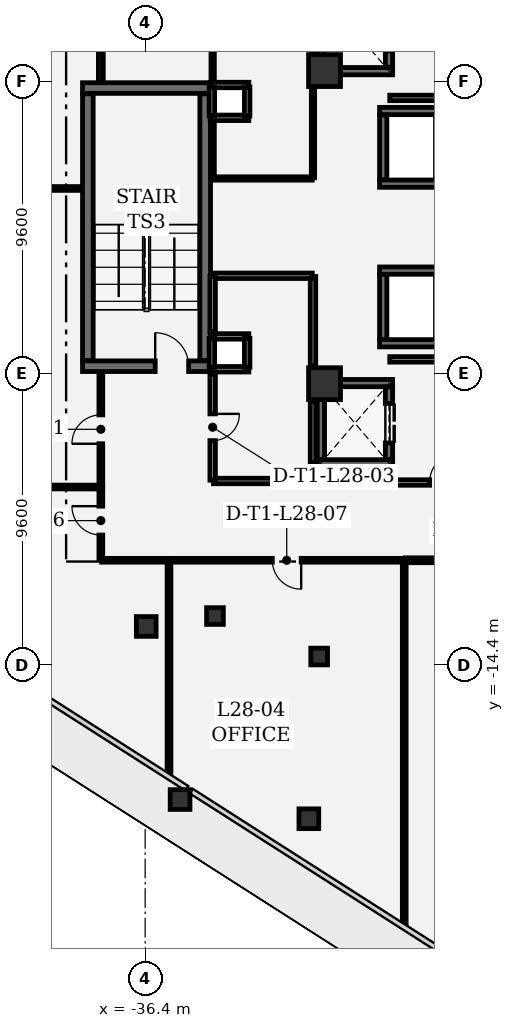
"""IFC4 building model, lengths in metres.
Left out: names, types, materials, properties, quantities, classifications, styles, units other than length and angle.
Written with IfcOpenShell. Run it as: python <this file> out.ifc"""

import sys

from ifc_helpers import new_model, si_unit, direction, frame, frame_2d, origin, origin_2d, place, context, subcontext, project, spatial, rectangle, extrude, element, fill, save


model = new_model("IFC4")
c1 = context("Model", 3, precision=1e-05, world=origin(), true_north=direction((0.0, 1.0)))
c2 = subcontext(c1, "Body", "Model", "MODEL_VIEW")
j1 = project(units=[si_unit("LENGTHUNIT", "METRE"), si_unit("PLANEANGLEUNIT", "RADIAN")], contexts=[c1])
p1 = place(None, origin())
s1 = spatial("IfcSite", under=j1, at=p1, CompositionType="ELEMENT")
p2 = place(p1, origin())
s2 = spatial("IfcBuilding", under=s1, at=p2, CompositionType="ELEMENT")
p3 = place(p2, frame((0.0, 0.0, 126.0)))
s3 = spatial("IfcBuildingStorey", under=s2, at=p3, CompositionType="ELEMENT", Elevation=126.0)
for number, where, z_axis, x_axis in (
    (1, (-30.5, 5.15, 0.0), (0.0, 0.0, 1.0), (1.0, 0.0, 0.0)),
    (2, (-30.5, -5.15, 0.0), (0.0, 0.0, 1.0), (1.0, 0.0, 0.0)),
):
    element("IfcColumn", number, at=place(p3, frame(where, z_axis=z_axis, x_axis=x_axis)), inside=s3, PredefinedType="COLUMN", context=c2, shape_type="SweptSolid", body=[
        extrude(rectangle(XDim=1.05, YDim=1.05, at=origin_2d()), origin(), (0.0, 0.0, 1.0), 4.05),
    ])
for number, where, z_axis, x_axis in (
    (3, (-35.252, -18.829, 0.0), (0.0, 0.0, 1.0), (1.0, 0.0, 0.0)),
    (4, (-31.016, -19.46, 0.0), (0.0, 0.0, 1.0), (1.0, 0.0, 0.0)),
    (5, (-36.365, -13.135, 0.0), (0.0, 0.0, 1.0), (1.0, 0.0, 0.0)),
):
    element("IfcColumn", number, at=place(p3, frame(where, z_axis=z_axis, x_axis=x_axis)), inside=s3, PredefinedType="COLUMN", context=c2, shape_type="SweptSolid", body=[
        extrude(rectangle(XDim=0.65, YDim=0.65, at=origin_2d()), origin(), (0.0, 0.0, 1.0), 4.05),
    ])
for number, where, z_axis, x_axis in (
    (6, (-34.104, -12.792, 0.0), (0.0, 0.0, 1.0), (1.0, 0.0, 0.0)),
    (7, (-30.677, -14.124, 0.0), (0.0, 0.0, 1.0), (1.0, 0.0, 0.0)),
):
    element("IfcColumn", number, at=place(p3, frame(where, z_axis=z_axis, x_axis=x_axis)), inside=s3, PredefinedType="COLUMN", context=c2, shape_type="SweptSolid", body=[
        extrude(rectangle(XDim=0.55, YDim=0.55, at=origin_2d()), origin(), (0.0, 0.0, 1.0), 4.05),
    ])
p4 = place(p3, frame((-38.46, -4.575, 0.0), z_axis=(0.0, 0.0, 1.0), x_axis=(1.0, 0.0, 0.0)))
e8 = element("IfcWall", 8, at=p4, inside=s3, PredefinedType="SHEAR", context=c2, shape_type="SweptSolid", body=[
    extrude(rectangle(XDim=4.21, YDim=0.35, at=frame_2d((2.105, 0.0))), origin(), (0.0, 0.0, 1.0), 3.77),
])
p5 = place(p4, frame((2.39, 0.0, 0.0)))
e9 = element("IfcOpeningElement", 9, at=p5, cuts=e8, PredefinedType="OPENING", context=c2, shape_type="SweptSolid", body=[
    extrude(rectangle(XDim=1.1, YDim=2.2, at=frame_2d((0.55, 1.1))), frame((0.0, 0.185, 0.0), z_axis=(0.0, -1.0, 0.0), x_axis=(1.0, 0.0, 0.0)), (0.0, 0.0, 1.0), 0.37),
])
p6 = place(p3, frame((-34.25, 4.575, 0.0), z_axis=(0.0, 0.0, 1.0), x_axis=(-1.0, 0.0, 0.0)))
e10 = element("IfcWall", 10, at=p6, inside=s3, PredefinedType="SHEAR", context=c2, shape_type="SweptSolid", body=[
    extrude(rectangle(XDim=4.21, YDim=0.35, at=frame_2d((2.105, 0.0))), origin(), (0.0, 0.0, 1.0), 3.77),
])
for number, where, z_axis, x_axis in (
    (11, (-34.425, -4.385, 0.0), (0.0, 0.0, 1.0), (0.0, 1.0, 0.0)),
    (12, (-38.285, 4.385, 0.0), (0.0, 0.0, 1.0), (0.0, -1.0, 0.0)),
):
    element("IfcWall", number, at=place(p3, frame(where, z_axis=z_axis, x_axis=x_axis)), inside=s3, PredefinedType="SHEAR", context=c2, shape_type="SweptSolid", body=[
        extrude(rectangle(XDim=8.77, YDim=0.35, at=frame_2d((4.385, 0.0))), origin(), (0.0, 0.0, 1.0), 3.77),
    ])
p7 = place(p3, frame((-28.26, 5.13, 0.0), z_axis=(0.0, 0.0, 1.0), x_axis=(-1.0, 0.0, 0.0)))
e13 = element("IfcWall", 13, at=p7, inside=s3, PredefinedType="SHEAR", context=c2, shape_type="SweptSolid", body=[
    extrude(rectangle(XDim=2.48, YDim=0.24, at=frame_2d((1.24, 0.0))), origin(), (0.0, 0.0, 1.0), 3.77),
])
p8 = place(p3, frame((-30.62, 5.262, 0.0), z_axis=(0.0, 0.0, 1.0), x_axis=(0.0, 1.0, 0.0)))
e14 = element("IfcWall", 14, at=p8, inside=s3, PredefinedType="SHEAR", context=c2, shape_type="SweptSolid", body=[
    extrude(rectangle(XDim=2.376, YDim=0.24, at=frame_2d((1.188, 0.0))), origin(), (0.0, 0.0, 1.0), 3.77),
])
p9 = place(p3, frame((-28.38, 7.638, 0.0), z_axis=(0.0, 0.0, 1.0), x_axis=(0.0, -1.0, 0.0)))
e15 = element("IfcWall", 15, at=p9, inside=s3, PredefinedType="SHEAR", context=c2, shape_type="SweptSolid", body=[
    extrude(rectangle(XDim=2.376, YDim=0.24, at=frame_2d((1.188, 0.0))), origin(), (0.0, 0.0, 1.0), 3.77),
])
p10 = place(p9, frame((0.538, 0.0, 0.0)))
e16 = element("IfcOpeningElement", 16, at=p10, cuts=e15, PredefinedType="OPENING", context=c2, shape_type="SweptSolid", body=[
    extrude(rectangle(XDim=1.3, YDim=2.3, at=frame_2d((0.65, 1.15))), frame((0.0, 0.13, 0.0), z_axis=(0.0, -1.0, 0.0), x_axis=(1.0, 0.0, 0.0)), (0.0, 0.0, 1.0), 0.26),
])
for number, where, z_axis, x_axis in (
    (17, (-28.26, -7.77, 0.0), (0.0, 0.0, 1.0), (-1.0, 0.0, 0.0)),
    (18, (-30.74, -5.13, 0.0), (0.0, 0.0, 1.0), (1.0, 0.0, 0.0)),
):
    element("IfcWall", number, at=place(p3, frame(where, z_axis=z_axis, x_axis=x_axis)), inside=s3, PredefinedType="SHEAR", context=c2, shape_type="SweptSolid", body=[
        extrude(rectangle(XDim=2.48, YDim=0.24, at=frame_2d((1.24, 0.0))), origin(), (0.0, 0.0, 1.0), 3.77),
    ])
p11 = place(p3, frame((-30.62, -7.638, 0.0), z_axis=(0.0, 0.0, 1.0), x_axis=(0.0, 1.0, 0.0)))
e19 = element("IfcWall", 19, at=p11, inside=s3, PredefinedType="SHEAR", context=c2, shape_type="SweptSolid", body=[
    extrude(rectangle(XDim=2.376, YDim=0.24, at=frame_2d((1.188, 0.0))), origin(), (0.0, 0.0, 1.0), 3.77),
])
p12 = place(p3, frame((-28.38, -5.262, 0.0), z_axis=(0.0, 0.0, 1.0), x_axis=(0.0, -1.0, 0.0)))
e20 = element("IfcWall", 20, at=p12, inside=s3, PredefinedType="SHEAR", context=c2, shape_type="SweptSolid", body=[
    extrude(rectangle(XDim=2.376, YDim=0.24, at=frame_2d((1.188, 0.0))), origin(), (0.0, 0.0, 1.0), 3.77),
])
p13 = place(p12, frame((0.538, 0.0, 0.0)))
e21 = element("IfcOpeningElement", 21, at=p13, cuts=e20, PredefinedType="OPENING", context=c2, shape_type="SweptSolid", body=[
    extrude(rectangle(XDim=1.3, YDim=2.3, at=frame_2d((0.65, 1.15))), frame((0.0, 0.13, 0.0), z_axis=(0.0, -1.0, 0.0), x_axis=(1.0, 0.0, 0.0)), (0.0, 0.0, 1.0), 0.26),
])
for number, where, z_axis, x_axis in (
    (22, (-26.61, 1.43, 0.0), (0.0, 0.0, 1.0), (-1.0, 0.0, 0.0)),
    (23, (-28.69, 3.82, 0.0), (0.0, 0.0, 1.0), (1.0, 0.0, 0.0)),
):
    element("IfcWall", number, at=place(p3, frame(where, z_axis=z_axis, x_axis=x_axis)), inside=s3, PredefinedType="SHEAR", context=c2, shape_type="SweptSolid", body=[
        extrude(rectangle(XDim=2.08, YDim=0.24, at=frame_2d((1.04, 0.0))), origin(), (0.0, 0.0, 1.0), 3.77),
    ])
p14 = place(p3, frame((-28.57, 1.562, 0.0), z_axis=(0.0, 0.0, 1.0), x_axis=(0.0, 1.0, 0.0)))
e24 = element("IfcWall", 24, at=p14, inside=s3, PredefinedType="SHEAR", context=c2, shape_type="SweptSolid", body=[
    extrude(rectangle(XDim=2.126, YDim=0.24, at=frame_2d((1.063, 0.0))), origin(), (0.0, 0.0, 1.0), 3.77),
])
for number, where, z_axis, x_axis in (
    (25, (-26.61, -3.82, 0.0), (0.0, 0.0, 1.0), (-1.0, 0.0, 0.0)),
    (26, (-28.69, -1.43, 0.0), (0.0, 0.0, 1.0), (1.0, 0.0, 0.0)),
):
    element("IfcWall", number, at=place(p3, frame(where, z_axis=z_axis, x_axis=x_axis)), inside=s3, PredefinedType="SHEAR", context=c2, shape_type="SweptSolid", body=[
        extrude(rectangle(XDim=2.08, YDim=0.24, at=frame_2d((1.04, 0.0))), origin(), (0.0, 0.0, 1.0), 3.77),
    ])
p15 = place(p3, frame((-28.57, -3.688, 0.0), z_axis=(0.0, 0.0, 1.0), x_axis=(0.0, 1.0, 0.0)))
e27 = element("IfcWall", 27, at=p15, inside=s3, PredefinedType="SHEAR", context=c2, shape_type="SweptSolid", body=[
    extrude(rectangle(XDim=2.126, YDim=0.24, at=frame_2d((1.063, 0.0))), origin(), (0.0, 0.0, 1.0), 3.77),
])
for number, where, z_axis, x_axis in (
    (28, (-32.99, 3.595, 0.0), (0.0, 0.0, 1.0), (-1.0, 0.0, 0.0)),
    (29, (-34.26, 4.675, 0.0), (0.0, 0.0, 1.0), (1.0, 0.0, 0.0)),
):
    element("IfcWall", number, at=place(p3, frame(where, z_axis=z_axis, x_axis=x_axis)), inside=s3, PredefinedType="PARTITIONING", context=c2, shape_type="SweptSolid", body=[
        extrude(rectangle(XDim=1.27, YDim=0.18, at=frame_2d((0.635, 0.0))), origin(), (0.0, 0.0, 1.0), 3.77),
    ])
for number, where, z_axis, x_axis in (
    (30, (-34.205, 3.66, 0.0), (0.0, 0.0, 1.0), (0.0, 1.0, 0.0)),
    (31, (-33.045, 4.61, 0.0), (0.0, 0.0, 1.0), (0.0, -1.0, 0.0)),
):
    element("IfcWall", number, at=place(p3, frame(where, z_axis=z_axis, x_axis=x_axis)), inside=s3, PredefinedType="PARTITIONING", context=c2, shape_type="SweptSolid", body=[
        extrude(rectangle(XDim=0.95, YDim=0.18, at=frame_2d((0.475, 0.0))), origin(), (0.0, 0.0, 1.0), 3.77),
    ])
for number, where, z_axis, x_axis in (
    (32, (-32.99, -4.675, 0.0), (0.0, 0.0, 1.0), (-1.0, 0.0, 0.0)),
    (33, (-34.26, -3.595, 0.0), (0.0, 0.0, 1.0), (1.0, 0.0, 0.0)),
):
    element("IfcWall", number, at=place(p3, frame(where, z_axis=z_axis, x_axis=x_axis)), inside=s3, PredefinedType="PARTITIONING", context=c2, shape_type="SweptSolid", body=[
        extrude(rectangle(XDim=1.27, YDim=0.18, at=frame_2d((0.635, 0.0))), origin(), (0.0, 0.0, 1.0), 3.77),
    ])
for number, where, z_axis, x_axis in (
    (34, (-34.205, -4.61, 0.0), (0.0, 0.0, 1.0), (0.0, 1.0, 0.0)),
    (35, (-33.045, -3.66, 0.0), (0.0, 0.0, 1.0), (0.0, -1.0, 0.0)),
):
    element("IfcWall", number, at=place(p3, frame(where, z_axis=z_axis, x_axis=x_axis)), inside=s3, PredefinedType="PARTITIONING", context=c2, shape_type="SweptSolid", body=[
        extrude(rectangle(XDim=0.95, YDim=0.18, at=frame_2d((0.475, 0.0))), origin(), (0.0, 0.0, 1.0), 3.77),
    ])
p16 = place(p3, frame((-28.355, 4.25, 0.0), z_axis=(0.0, 0.0, 1.0), x_axis=(1.0, 0.0, 0.0)))
e36 = element("IfcWall", 36, at=p16, inside=s3, PredefinedType="PARTITIONING", context=c2, shape_type="SweptSolid", body=[
    extrude(rectangle(XDim=3.622, YDim=0.18, at=frame_2d((1.811, 0.0))), origin(), (0.0, 0.0, 1.0), 3.77),
])
p17 = place(p3, frame((-28.355, -8.4, 0.0), z_axis=(0.0, 0.0, 1.0), x_axis=(1.0, 0.0, 0.0)))
e37 = element("IfcWall", 37, at=p17, inside=s3, PredefinedType="PARTITIONING", context=c2, shape_type="SweptSolid", body=[
    extrude(rectangle(XDim=3.622, YDim=0.18, at=frame_2d((1.811, 0.0))), origin(), (0.0, 0.0, 1.0), 3.77),
])
p18 = place(p17, frame((1.311, 0.0, 0.0)))
e38 = element("IfcOpeningElement", 38, at=p18, cuts=e37, PredefinedType="OPENING", context=c2, shape_type="SweptSolid", body=[
    extrude(rectangle(XDim=1.0, YDim=2.15, at=frame_2d((0.5, 1.075))), frame((0.0, 0.1, 0.0), z_axis=(0.0, -1.0, 0.0), x_axis=(1.0, 0.0, 0.0)), (0.0, 0.0, 1.0), 0.2),
])
p19 = place(p3, frame((-24.733, -4.35, 0.0), z_axis=(0.0, 0.0, 1.0), x_axis=(-1.0, 0.0, 0.0)))
e39 = element("IfcWall", 39, at=p19, inside=s3, PredefinedType="PARTITIONING", context=c2, shape_type="SweptSolid", body=[
    extrude(rectangle(XDim=3.622, YDim=0.18, at=frame_2d((1.811, 0.0))), origin(), (0.0, 0.0, 1.0), 3.77),
])
p20 = place(p3, frame((-34.155, 1.6, 0.0), z_axis=(0.0, 0.0, 1.0), x_axis=(1.0, 0.0, 0.0)))
e40 = element("IfcWall", 40, at=p20, inside=s3, PredefinedType="PARTITIONING", context=c2, shape_type="SweptSolid", body=[
    extrude(rectangle(XDim=3.25, YDim=0.11, at=frame_2d((1.625, 0.0))), origin(), (0.0, 0.0, 1.0), 3.77),
])
p21 = place(p3, frame((-30.88, 1.625, 0.0), z_axis=(0.0, 0.0, 1.0), x_axis=(0.0, 1.0, 0.0)))
e41 = element("IfcWall", 41, at=p21, inside=s3, PredefinedType="PARTITIONING", context=c2, shape_type="SweptSolid", body=[
    extrude(rectangle(XDim=2.935, YDim=0.11, at=frame_2d((1.468, 0.0))), origin(), (0.0, 0.0, 1.0), 3.77),
])
p22 = place(p3, frame((-30.88, 5.74, 0.0), z_axis=(0.0, 0.0, 1.0), x_axis=(0.0, 1.0, 0.0)))
e42 = element("IfcWall", 42, at=p22, inside=s3, PredefinedType="PARTITIONING", context=c2, shape_type="SweptSolid", body=[
    extrude(rectangle(XDim=2.003, YDim=0.11, at=frame_2d((1.001, 0.0))), origin(), (0.0, 0.0, 1.0), 3.77),
])
p23 = place(p3, frame((-34.18, 8.225, 0.0), z_axis=(0.0, 0.0, 1.0), x_axis=(0.0, -1.0, 0.0)))
e43 = element("IfcWall", 43, at=p23, inside=s3, PredefinedType="PARTITIONING", context=c2, shape_type="SweptSolid", body=[
    extrude(rectangle(XDim=3.385, YDim=0.11, at=frame_2d((1.692, 0.0))), origin(), (0.0, 0.0, 1.0), 3.77),
])
p24 = place(p23, frame((1.252, 0.0, 0.0)))
e44 = element("IfcOpeningElement", 44, at=p24, cuts=e43, PredefinedType="OPENING", context=c2, shape_type="SweptSolid", body=[
    extrude(rectangle(XDim=0.88, YDim=2.1, at=frame_2d((0.44, 1.05))), frame((0.0, 0.065, 0.0), z_axis=(0.0, -1.0, 0.0), x_axis=(1.0, 0.0, 0.0)), (0.0, 0.0, 1.0), 0.13),
])
p25 = place(p3, frame((-34.18, 3.43, 0.0), z_axis=(0.0, 0.0, 1.0), x_axis=(0.0, -1.0, 0.0)))
e45 = element("IfcWall", 45, at=p25, inside=s3, PredefinedType="PARTITIONING", context=c2, shape_type="SweptSolid", body=[
    extrude(rectangle(XDim=1.805, YDim=0.11, at=frame_2d((0.902, 0.0))), origin(), (0.0, 0.0, 1.0), 3.77),
])
p26 = place(p3, frame((-34.155, -8.35, 0.0), z_axis=(0.0, 0.0, 1.0), x_axis=(1.0, 0.0, 0.0)))
e46 = element("IfcWall", 46, at=p26, inside=s3, PredefinedType="PARTITIONING", context=c2, shape_type="SweptSolid", body=[
    extrude(rectangle(XDim=3.25, YDim=0.18, at=frame_2d((1.625, 0.0))), origin(), (0.0, 0.0, 1.0), 3.77),
])
p27 = place(p3, frame((-30.88, -7.743, 0.0), z_axis=(0.0, 0.0, 1.0), x_axis=(0.0, 1.0, 0.0)))
e47 = element("IfcWall", 47, at=p27, inside=s3, PredefinedType="PARTITIONING", context=c2, shape_type="SweptSolid", body=[
    extrude(rectangle(XDim=2.003, YDim=0.18, at=frame_2d((1.001, 0.0))), origin(), (0.0, 0.0, 1.0), 3.77),
])
p28 = place(p3, frame((-30.88, -4.56, 0.0), z_axis=(0.0, 0.0, 1.0), x_axis=(0.0, 1.0, 0.0)))
e48 = element("IfcWall", 48, at=p28, inside=s3, PredefinedType="PARTITIONING", context=c2, shape_type="SweptSolid", body=[
    extrude(rectangle(XDim=2.935, YDim=0.18, at=frame_2d((1.468, 0.0))), origin(), (0.0, 0.0, 1.0), 3.77),
])
p29 = place(p3, frame((-30.905, -1.6, 0.0), z_axis=(0.0, 0.0, 1.0), x_axis=(-1.0, 0.0, 0.0)))
e49 = element("IfcWall", 49, at=p29, inside=s3, PredefinedType="PARTITIONING", context=c2, shape_type="SweptSolid", body=[
    extrude(rectangle(XDim=3.25, YDim=0.18, at=frame_2d((1.625, 0.0))), origin(), (0.0, 0.0, 1.0), 3.77),
])
p30 = place(p3, frame((-34.18, -1.625, 0.0), z_axis=(0.0, 0.0, 1.0), x_axis=(0.0, -1.0, 0.0)))
e50 = element("IfcWall", 50, at=p30, inside=s3, PredefinedType="PARTITIONING", context=c2, shape_type="SweptSolid", body=[
    extrude(rectangle(XDim=1.805, YDim=0.18, at=frame_2d((0.902, 0.0))), origin(), (0.0, 0.0, 1.0), 3.77),
])
p31 = place(p3, frame((-34.18, -4.84, 0.0), z_axis=(0.0, 0.0, 1.0), x_axis=(0.0, -1.0, 0.0)))
e51 = element("IfcWall", 51, at=p31, inside=s3, PredefinedType="PARTITIONING", context=c2, shape_type="SweptSolid", body=[
    extrude(rectangle(XDim=3.485, YDim=0.18, at=frame_2d((1.743, 0.0))), origin(), (0.0, 0.0, 1.0), 3.77),
])
p32 = place(p31, frame((1.302, 0.0, 0.0)))
e52 = element("IfcOpeningElement", 52, at=p32, cuts=e51, PredefinedType="OPENING", context=c2, shape_type="SweptSolid", body=[
    extrude(rectangle(XDim=0.88, YDim=2.1, at=frame_2d((0.44, 1.05))), frame((0.0, 0.1, 0.0), z_axis=(0.0, -1.0, 0.0), x_axis=(1.0, 0.0, 0.0)), (0.0, 0.0, 1.0), 0.2),
])
p33 = place(p3, frame((-35.64, -10.958, 0.0), z_axis=(0.0, 0.0, 1.0), x_axis=(-1.0, 0.0, 0.0)))
e53 = element("IfcWall", 53, at=p33, inside=s3, PredefinedType="PARTITIONING", context=c2, shape_type="SweptSolid", body=[
    extrude(rectangle(XDim=2.193, YDim=0.125, at=frame_2d((1.096, 0.0))), origin(), (0.0, 0.0, 1.0), 3.334),
])
p34 = place(p3, frame((-37.858, -10.933, 0.0), z_axis=(0.0, 0.0, 1.0), x_axis=(0.0, 1.0, 0.0)))
e54 = element("IfcWall", 54, at=p34, inside=s3, PredefinedType="PARTITIONING", context=c2, shape_type="SweptSolid", body=[
    extrude(rectangle(XDim=2.358, YDim=0.125, at=frame_2d((1.179, 0.0))), origin(), (0.0, 0.0, 1.0), 3.77),
])
p35 = place(p34, frame((0.805, 0.0, 0.0)))
e55 = element("IfcOpeningElement", 55, at=p35, cuts=e54, PredefinedType="OPENING", context=c2, shape_type="SweptSolid", body=[
    extrude(rectangle(XDim=0.95, YDim=2.15, at=frame_2d((0.475, 1.075))), frame((0.0, 0.073, 0.0), z_axis=(0.0, -1.0, 0.0), x_axis=(1.0, 0.0, 0.0)), (0.0, 0.0, 1.0), 0.145),
])
p36 = place(p3, frame((-37.883, -8.55, 0.0), z_axis=(0.0, 0.0, 1.0), x_axis=(-0.999999323514, 0.001163173127, 0.0)))
e56 = element("IfcWall", 56, at=p36, inside=s3, PredefinedType="PARTITIONING", context=c2, shape_type="SweptSolid", body=[
    extrude(rectangle(XDim=12.594, YDim=0.125, at=frame_2d((6.297, 0.0))), origin(), (0.0, 0.0, 1.0), 2.89),
])
p37 = place(p3, frame((-35.615, -18.004, 0.0), z_axis=(0.0, 0.0, 1.0), x_axis=(0.0, 1.0, 0.0)))
e57 = element("IfcWall", 57, at=p37, inside=s3, PredefinedType="PARTITIONING", context=c2, shape_type="SweptSolid", body=[
    extrude(rectangle(XDim=7.021, YDim=0.125, at=frame_2d((3.511, 0.0))), origin(), (0.0, 0.0, 1.0), 3.77),
])
p38 = place(p3, frame((-27.904, -10.958, 0.0), z_axis=(0.0, 0.0, 1.0), x_axis=(-1.0, 0.0, 0.0)))
e58 = element("IfcWall", 58, at=p38, inside=s3, PredefinedType="PARTITIONING", context=c2, shape_type="SweptSolid", body=[
    extrude(rectangle(XDim=7.679, YDim=0.125, at=frame_2d((3.839, 0.0))), origin(), (0.0, 0.0, 1.0), 3.334),
])
p39 = place(p38, frame((3.365, 0.0, 0.0)))
e59 = element("IfcOpeningElement", 59, at=p39, cuts=e58, PredefinedType="OPENING", context=c2, shape_type="SweptSolid", body=[
    extrude(rectangle(XDim=0.95, YDim=2.15, at=frame_2d((0.475, 1.075))), frame((0.0, 0.073, 0.0), z_axis=(0.0, -1.0, 0.0), x_axis=(1.0, 0.0, 0.0)), (0.0, 0.0, 1.0), 0.145),
])
p40 = place(p3, frame((-27.879, -22.949, 0.0), z_axis=(0.0, 0.0, 1.0), x_axis=(0.0, 1.0, 0.0)))
e60 = element("IfcWall", 60, at=p40, inside=s3, PredefinedType="PARTITIONING", context=c2, shape_type="SweptSolid", body=[
    extrude(rectangle(XDim=11.966, YDim=0.125, at=frame_2d((5.983, 0.0))), origin(), (0.0, 0.0, 1.0), 3.334),
])
p41 = place(p3, frame((-24.19, -10.958, 0.0), z_axis=(0.0, 0.0, 1.0), x_axis=(-1.0, 0.0, 0.0)))
e61 = element("IfcWall", 61, at=p41, inside=s3, PredefinedType="PARTITIONING", context=c2, shape_type="SweptSolid", body=[
    extrude(rectangle(XDim=3.656, YDim=0.16, at=frame_2d((1.828, 0.0))), origin(), (0.0, 0.0, 1.0), 3.77),
])
p42 = place(p3, frame((-37.858, -8.517, 0.0), z_axis=(0.0, 0.0, 1.0), x_axis=(0.0, 1.0, 0.0)))
e62 = element("IfcWall", 62, at=p42, inside=s3, PredefinedType="PARTITIONING", context=c2, shape_type="SweptSolid", body=[
    extrude(rectangle(XDim=3.734, YDim=0.125, at=frame_2d((1.867, 0.0))), origin(), (0.0, 0.0, 1.0), 3.77),
])
p43 = place(p42, frame((1.392, 0.0, 0.0)))
e63 = element("IfcOpeningElement", 63, at=p43, cuts=e62, PredefinedType="OPENING", context=c2, shape_type="SweptSolid", body=[
    extrude(rectangle(XDim=0.95, YDim=2.15, at=frame_2d((0.475, 1.075))), frame((0.0, 0.073, 0.0), z_axis=(0.0, -1.0, 0.0), x_axis=(1.0, 0.0, 0.0)), (0.0, 0.0, 1.0), 0.145),
])
p44 = place(p3, frame((-38.493, 1.271, 0.0), z_axis=(0.0, 0.0, 1.0), x_axis=(-0.999999998722, 5.0556756e-05, 0.0)))
e64 = element("IfcWall", 64, at=p44, inside=s3, PredefinedType="PARTITIONING", context=c2, shape_type="SweptSolid", body=[
    extrude(rectangle(XDim=19.316, YDim=0.125, at=frame_2d((9.658, 0.0))), origin(), (0.0, 0.0, 1.0), 3.77),
])
p45 = place(p3, frame((-37.858, 4.783, 0.0), z_axis=(0.0, 0.0, 1.0), x_axis=(0.0, 1.0, 0.0)))
e65 = element("IfcWall", 65, at=p45, inside=s3, PredefinedType="PARTITIONING", context=c2, shape_type="SweptSolid", body=[
    extrude(rectangle(XDim=3.534, YDim=0.16, at=frame_2d((1.767, 0.0))), origin(), (0.0, 0.0, 1.0), 3.77),
])
p46 = place(p45, frame((1.217, 0.0, 0.0)))
e66 = element("IfcOpeningElement", 66, at=p46, cuts=e65, PredefinedType="OPENING", context=c2, shape_type="SweptSolid", body=[
    extrude(rectangle(XDim=1.1, YDim=2.15, at=frame_2d((0.55, 1.075))), frame((0.0, 0.09, 0.0), z_axis=(0.0, -1.0, 0.0), x_axis=(1.0, 0.0, 0.0)), (0.0, 0.0, 1.0), 0.18),
])
p47 = place(p5, origin())
e67 = element("IfcDoor", 67, at=p47, inside=s3, OperationType="SINGLE_SWING_LEFT", PredefinedType="DOOR", context=c2, shape_type="SweptSolid", body=[
    extrude(rectangle(XDim=1.1, YDim=2.2, at=frame_2d((0.55, 1.1))), frame((0.0, 0.025, 0.0), z_axis=(0.0, -1.0, 0.0), x_axis=(1.0, 0.0, 0.0)), (0.0, 0.0, 1.0), 0.05),
])
fill(e9, e67)
p48 = place(p13, origin())
e68 = element("IfcDoor", 68, at=p48, inside=s3, OperationType="DOUBLE_DOOR_SLIDING", PredefinedType="DOOR", context=c2, shape_type="SweptSolid", body=[
    extrude(rectangle(XDim=1.3, YDim=2.3, at=frame_2d((0.65, 1.15))), frame((0.0, 0.025, 0.0), z_axis=(0.0, -1.0, 0.0), x_axis=(1.0, 0.0, 0.0)), (0.0, 0.0, 1.0), 0.05),
])
fill(e21, e68)
p49 = place(p32, origin())
e69 = element("IfcDoor", 69, at=p49, inside=s3, OperationType="SINGLE_SWING_LEFT", PredefinedType="DOOR", context=c2, shape_type="SweptSolid", body=[
    extrude(rectangle(XDim=0.88, YDim=2.1, at=frame_2d((0.44, 1.05))), frame((0.0, 0.025, 0.0), z_axis=(0.0, -1.0, 0.0), x_axis=(1.0, 0.0, 0.0)), (0.0, 0.0, 1.0), 0.05),
])
fill(e52, e69)
p50 = place(p35, origin())
e70 = element("IfcDoor", 70, at=p50, inside=s3, OperationType="SINGLE_SWING_RIGHT", PredefinedType="DOOR", context=c2, shape_type="SweptSolid", body=[
    extrude(rectangle(XDim=0.95, YDim=2.15, at=frame_2d((0.475, 1.075))), frame((0.0, 0.025, 0.0), z_axis=(0.0, -1.0, 0.0), x_axis=(1.0, 0.0, 0.0)), (0.0, 0.0, 1.0), 0.05),
])
fill(e55, e70)
p51 = place(p39, origin())
e71 = element("IfcDoor", 71, at=p51, inside=s3, OperationType="SINGLE_SWING_LEFT", PredefinedType="DOOR", context=c2, shape_type="SweptSolid", body=[
    extrude(rectangle(XDim=0.95, YDim=2.15, at=frame_2d((0.475, 1.075))), frame((0.0, 0.025, 0.0), z_axis=(0.0, -1.0, 0.0), x_axis=(1.0, 0.0, 0.0)), (0.0, 0.0, 1.0), 0.05),
])
fill(e59, e71)
p52 = place(p43, origin())
e72 = element("IfcDoor", 72, at=p52, inside=s3, OperationType="SINGLE_SWING_LEFT", PredefinedType="DOOR", context=c2, shape_type="SweptSolid", body=[
    extrude(rectangle(XDim=0.95, YDim=2.15, at=frame_2d((0.475, 1.075))), frame((0.0, 0.025, 0.0), z_axis=(0.0, -1.0, 0.0), x_axis=(1.0, 0.0, 0.0)), (0.0, 0.0, 1.0), 0.05),
])
fill(e63, e72)
p53 = place(p18, origin())
e73 = element("IfcDoor", 73, at=p53, inside=s3, OperationType="SINGLE_SWING_RIGHT", PredefinedType="DOOR", context=c2, shape_type="SweptSolid", body=[
    extrude(rectangle(XDim=1.0, YDim=2.15, at=frame_2d((0.5, 1.075))), frame((0.0, 0.025, 0.0), z_axis=(0.0, -1.0, 0.0), x_axis=(1.0, 0.0, 0.0)), (0.0, 0.0, 1.0), 0.05),
])
fill(e38, e73)
save(model, sys.argv[1])
